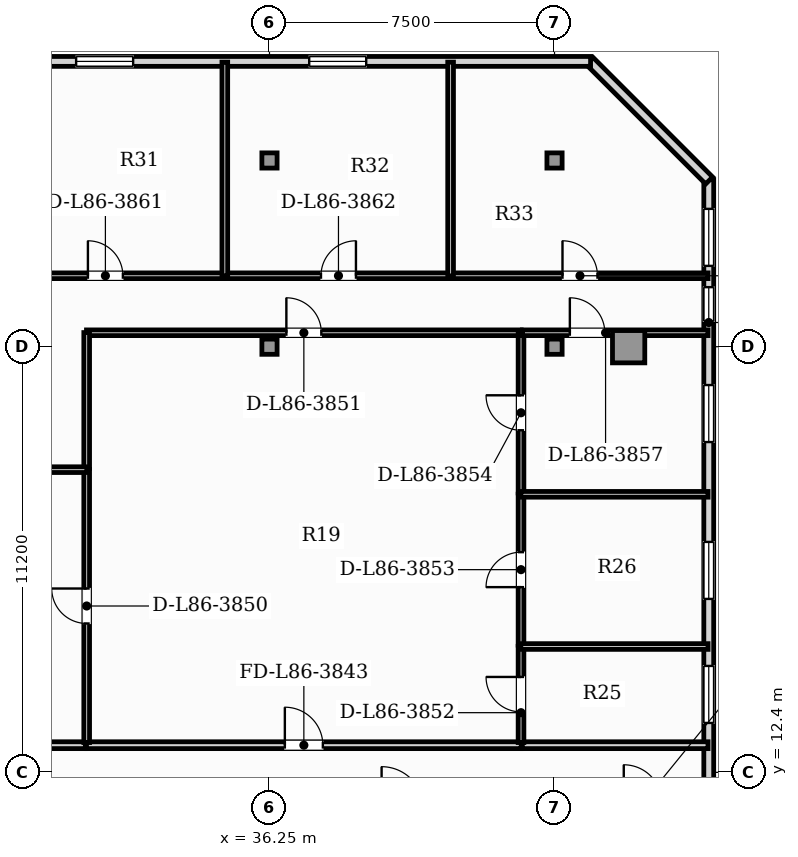
"""IFC4 building model, lengths in metres.
Left out: names, types, materials, properties, quantities, classifications, styles, units other than length and angle.
Written with IfcOpenShell. Run it as: python <this file> out.ifc"""

import sys

from ifc_helpers import new_model, si_unit, direction, frame, frame_2d, origin, origin_2d, place, context, subcontext, project, spatial, rectangle, hollow_rectangle, extrude, element, fill, save


model = new_model("IFC4")
c1 = context("Model", 3, precision=1e-05, world=origin(), true_north=direction((0.0, 1.0)))
c2 = subcontext(c1, "Body", "Model", "MODEL_VIEW")
j1 = project(units=[si_unit("LENGTHUNIT", "METRE"), si_unit("PLANEANGLEUNIT", "RADIAN")], contexts=[c1])
p1 = place(None, origin())
s1 = spatial("IfcSite", under=j1, at=p1, CompositionType="ELEMENT")
p2 = place(p1, origin())
s2 = spatial("IfcBuilding", under=s1, at=p2, CompositionType="ELEMENT")
p3 = place(p2, frame((0.0, 0.0, 349.05)))
s3 = spatial("IfcBuildingStorey", under=s2, at=p3, CompositionType="ELEMENT", Elevation=349.05)
p4 = place(p3, frame((45.7, 23.6, 0.0), z_axis=(0.0, 0.0, 1.0), x_axis=(1.0, 0.0, 0.0)))
e1 = element("IfcColumn", 1, at=p4, inside=s3, PredefinedType="USERDEFINED", context=c2, shape_type="SweptSolid", body=[
    extrude(hollow_rectangle(XDim=0.85, YDim=0.85, WallThickness=0.05, at=origin_2d()), origin(), (0.0, 0.0, 1.0), 4.4),
])
for number, where, z_axis, x_axis in (
    (2, (36.25, 23.6, 0.0), (0.0, 0.0, 1.0), (1.0, 0.0, 0.0)),
    (3, (43.75, 23.6, 0.0), (0.0, 0.0, 1.0), (1.0, 0.0, 0.0)),
    (4, (36.25, 28.5, 0.0), (0.0, 0.0, 1.0), (1.0, 0.0, 0.0)),
    (5, (43.75, 28.5, 0.0), (0.0, 0.0, 1.0), (1.0, 0.0, 0.0)),
):
    element("IfcColumn", number, at=place(p3, frame(where, z_axis=z_axis, x_axis=x_axis)), inside=s3, PredefinedType="COLUMN", context=c2, shape_type="SweptSolid", body=[
        extrude(hollow_rectangle(XDim=0.4, YDim=0.4, WallThickness=0.02, at=origin_2d()), origin(), (0.0, 0.0, 1.0), 4.4),
    ])
p5 = place(p3, frame((47.808, 3.24, 0.0), z_axis=(0.0, 0.0, 1.0), x_axis=(0.0, 1.0, 0.0)))
e6 = element("IfcWall", 6, at=p5, inside=s3, PredefinedType="SOLIDWALL", context=c2, shape_type="SweptSolid", body=[
    extrude(rectangle(XDim=24.757, YDim=0.26, at=frame_2d((12.378, 0.0))), origin(), (0.0, 0.0, 1.0), 4.14),
])
p6 = place(p5, frame((21.027, 0.0, 0.95)))
e7 = element("IfcOpeningElement", 7, at=p6, cuts=e6, PredefinedType="OPENING", context=c2, shape_type="SweptSolid", body=[
    extrude(rectangle(XDim=0.9, YDim=1.5, at=frame_2d((0.45, 0.75))), frame((0.0, 0.14, 0.0), z_axis=(0.0, -1.0, 0.0), x_axis=(1.0, 0.0, 0.0)), (0.0, 0.0, 1.0), 0.28),
])
p7 = place(p5, frame((10.461, 0.0, 0.9)))
e8 = element("IfcOpeningElement", 8, at=p7, cuts=e6, PredefinedType="OPENING", context=c2, shape_type="SweptSolid", body=[
    extrude(rectangle(XDim=1.5, YDim=1.95, at=frame_2d((0.75, 0.975))), frame((0.0, 0.14, 0.0), z_axis=(0.0, -1.0, 0.0), x_axis=(1.0, 0.0, 0.0)), (0.0, 0.0, 1.0), 0.28),
])
p8 = place(p5, frame((13.724, 0.0, 0.9)))
e9 = element("IfcOpeningElement", 9, at=p8, cuts=e6, PredefinedType="OPENING", context=c2, shape_type="SweptSolid", body=[
    extrude(rectangle(XDim=1.5, YDim=1.95, at=frame_2d((0.75, 0.975))), frame((0.0, 0.14, 0.0), z_axis=(0.0, -1.0, 0.0), x_axis=(1.0, 0.0, 0.0)), (0.0, 0.0, 1.0), 0.28),
])
p9 = place(p5, frame((17.852, 0.0, 0.9)))
e10 = element("IfcOpeningElement", 10, at=p9, cuts=e6, PredefinedType="OPENING", context=c2, shape_type="SweptSolid", body=[
    extrude(rectangle(XDim=1.5, YDim=1.95, at=frame_2d((0.75, 0.975))), frame((0.0, 0.14, 0.0), z_axis=(0.0, -1.0, 0.0), x_axis=(1.0, 0.0, 0.0)), (0.0, 0.0, 1.0), 0.28),
])
p10 = place(p5, frame((22.487, 0.0, 0.9)))
e11 = element("IfcOpeningElement", 11, at=p10, cuts=e6, PredefinedType="OPENING", context=c2, shape_type="SweptSolid", body=[
    extrude(rectangle(XDim=1.5, YDim=1.95, at=frame_2d((0.75, 0.975))), frame((0.0, 0.14, 0.0), z_axis=(0.0, -1.0, 0.0), x_axis=(1.0, 0.0, 0.0)), (0.0, 0.0, 1.0), 0.28),
])
p11 = place(p3, frame((47.818, 27.973, 0.0), z_axis=(0.0, 0.0, 1.0), x_axis=(-0.707106781187, 0.707106781187, 0.0)))
e12 = element("IfcWall", 12, at=p11, inside=s3, PredefinedType="SOLIDWALL", context=c2, shape_type="SweptSolid", body=[
    extrude(rectangle(XDim=4.445, YDim=0.26, at=frame_2d((2.223, 0.0))), origin(), (0.0, 0.0, 1.0), 4.14),
])
p12 = place(p3, frame((44.698, 31.107, 0.0), z_axis=(0.0, 0.0, 1.0), x_axis=(-1.0, 0.0, 0.0)))
e13 = element("IfcWall", 13, at=p12, inside=s3, PredefinedType="SOLIDWALL", context=c2, shape_type="SweptSolid", body=[
    extrude(rectangle(XDim=31.896, YDim=0.26, at=frame_2d((15.948, 0.0))), origin(), (0.0, 0.0, 1.0), 4.14),
])
p13 = place(p12, frame((27.179, 0.0, 0.9)))
e14 = element("IfcOpeningElement", 14, at=p13, cuts=e13, PredefinedType="OPENING", context=c2, shape_type="SweptSolid", body=[
    extrude(rectangle(XDim=1.5, YDim=1.95, at=frame_2d((0.75, 0.975))), frame((0.0, 0.14, 0.0), z_axis=(0.0, -1.0, 0.0), x_axis=(1.0, 0.0, 0.0)), (0.0, 0.0, 1.0), 0.28),
])
p14 = place(p12, frame((23.149, 0.0, 0.9)))
e15 = element("IfcOpeningElement", 15, at=p14, cuts=e13, PredefinedType="OPENING", context=c2, shape_type="SweptSolid", body=[
    extrude(rectangle(XDim=1.5, YDim=1.95, at=frame_2d((0.75, 0.975))), frame((0.0, 0.14, 0.0), z_axis=(0.0, -1.0, 0.0), x_axis=(1.0, 0.0, 0.0)), (0.0, 0.0, 1.0), 0.28),
])
p15 = place(p12, frame((17.689, 0.0, 0.9)))
e16 = element("IfcOpeningElement", 16, at=p15, cuts=e13, PredefinedType="OPENING", context=c2, shape_type="SweptSolid", body=[
    extrude(rectangle(XDim=1.5, YDim=1.95, at=frame_2d((0.75, 0.975))), frame((0.0, 0.14, 0.0), z_axis=(0.0, -1.0, 0.0), x_axis=(1.0, 0.0, 0.0)), (0.0, 0.0, 1.0), 0.28),
])
p16 = place(p12, frame((12.036, 0.0, 0.9)))
e17 = element("IfcOpeningElement", 17, at=p16, cuts=e13, PredefinedType="OPENING", context=c2, shape_type="SweptSolid", body=[
    extrude(rectangle(XDim=1.5, YDim=1.95, at=frame_2d((0.75, 0.975))), frame((0.0, 0.14, 0.0), z_axis=(0.0, -1.0, 0.0), x_axis=(1.0, 0.0, 0.0)), (0.0, 0.0, 1.0), 0.28),
])
p17 = place(p12, frame((5.903, 0.0, 0.9)))
e18 = element("IfcOpeningElement", 18, at=p17, cuts=e13, PredefinedType="OPENING", context=c2, shape_type="SweptSolid", body=[
    extrude(rectangle(XDim=1.5, YDim=1.95, at=frame_2d((0.75, 0.975))), frame((0.0, 0.14, 0.0), z_axis=(0.0, -1.0, 0.0), x_axis=(1.0, 0.0, 0.0)), (0.0, 0.0, 1.0), 0.28),
])
p18 = place(p3, frame((31.435, 13.115, 0.0), z_axis=(0.0, 0.0, 1.0), x_axis=(1.0, 0.0, 0.0)))
e19 = element("IfcWall", 19, at=p18, inside=s3, PredefinedType="PARTITIONING", context=c2, shape_type="SweptSolid", body=[
    extrude(rectangle(XDim=11.438, YDim=0.18, at=frame_2d((5.719, 0.0))), origin(), (0.0, 0.0, 1.0), 4.14),
])
p19 = place(p18, frame((5.219, 0.0, 0.0)))
e20 = element("IfcOpeningElement", 20, at=p19, cuts=e19, PredefinedType="OPENING", context=c2, shape_type="SweptSolid", body=[
    extrude(rectangle(XDim=1.0, YDim=2.15, at=frame_2d((0.5, 1.075))), frame((0.0, 0.1, 0.0), z_axis=(0.0, -1.0, 0.0), x_axis=(1.0, 0.0, 0.0)), (0.0, 0.0, 1.0), 0.2),
])
p20 = place(p3, frame((26.095, 13.115, 0.0), z_axis=(0.0, 0.0, 1.0), x_axis=(1.0, 0.0, 0.0)))
e21 = element("IfcWall", 21, at=p20, inside=s3, PredefinedType="PARTITIONING", context=c2, shape_type="SweptSolid", body=[
    extrude(rectangle(XDim=5.31, YDim=0.18, at=frame_2d((2.655, 0.0))), origin(), (0.0, 0.0, 1.0), 4.14),
])
p21 = place(p20, frame((2.155, 0.0, 0.0)))
e22 = element("IfcOpeningElement", 22, at=p21, cuts=e21, PredefinedType="OPENING", context=c2, shape_type="SweptSolid", body=[
    extrude(rectangle(XDim=1.0, YDim=2.15, at=frame_2d((0.5, 1.075))), frame((0.0, 0.1, 0.0), z_axis=(0.0, -1.0, 0.0), x_axis=(1.0, 0.0, 0.0)), (0.0, 0.0, 1.0), 0.2),
])
p22 = place(p3, frame((42.903, 13.115, 0.0), z_axis=(0.0, 0.0, 1.0), x_axis=(1.0, 0.0, 0.0)))
e23 = element("IfcWall", 23, at=p22, inside=s3, PredefinedType="PARTITIONING", context=c2, shape_type="SweptSolid", body=[
    extrude(rectangle(XDim=4.885, YDim=0.18, at=frame_2d((2.443, 0.0))), origin(), (0.0, 0.0, 1.0), 4.14),
])
p23 = place(p3, frame((31.44, 13.185, 0.0), z_axis=(0.0, 0.0, 1.0), x_axis=(0.0, 1.0, 0.0)))
e24 = element("IfcWall", 24, at=p23, inside=s3, PredefinedType="PARTITIONING", context=c2, shape_type="SweptSolid", body=[
    extrude(rectangle(XDim=7.185, YDim=0.15, at=frame_2d((3.593, 0.0))), origin(), (0.0, 0.0, 1.0), 4.14),
])
p24 = place(p23, frame((3.133, 0.0, 0.0)))
e25 = element("IfcOpeningElement", 25, at=p24, cuts=e24, PredefinedType="OPENING", context=c2, shape_type="SweptSolid", body=[
    extrude(rectangle(XDim=0.92, YDim=2.1, at=frame_2d((0.46, 1.05))), frame((0.0, 0.085, 0.0), z_axis=(0.0, -1.0, 0.0), x_axis=(1.0, 0.0, 0.0)), (0.0, 0.0, 1.0), 0.17),
])
p25 = place(p3, frame((31.435, 23.967, 0.0), z_axis=(0.0, 0.0, 1.0), x_axis=(1.0, 0.0, 0.0)))
e26 = element("IfcWall", 26, at=p25, inside=s3, PredefinedType="PARTITIONING", context=c2, shape_type="SweptSolid", body=[
    extrude(rectangle(XDim=11.438, YDim=0.15, at=frame_2d((5.719, 0.0))), origin(), (0.0, 0.0, 1.0), 4.14),
])
p26 = place(p25, frame((5.259, 0.0, 0.0)))
e27 = element("IfcOpeningElement", 27, at=p26, cuts=e26, PredefinedType="OPENING", context=c2, shape_type="SweptSolid", body=[
    extrude(rectangle(XDim=0.92, YDim=2.1, at=frame_2d((0.46, 1.05))), frame((0.0, 0.085, 0.0), z_axis=(0.0, -1.0, 0.0), x_axis=(1.0, 0.0, 0.0)), (0.0, 0.0, 1.0), 0.17),
])
p27 = place(p3, frame((31.44, 20.4, 0.0), z_axis=(0.0, 0.0, 1.0), x_axis=(0.0, 1.0, 0.0)))
e28 = element("IfcWall", 28, at=p27, inside=s3, PredefinedType="PARTITIONING", context=c2, shape_type="SweptSolid", body=[
    extrude(rectangle(XDim=3.572, YDim=0.15, at=frame_2d((1.786, 0.0))), origin(), (0.0, 0.0, 1.0), 4.14),
])
p28 = place(p3, frame((42.868, 13.185, 0.0), z_axis=(0.0, 0.0, 1.0), x_axis=(0.0, 1.0, 0.0)))
e29 = element("IfcWall", 29, at=p28, inside=s3, PredefinedType="PARTITIONING", context=c2, shape_type="SweptSolid", body=[
    extrude(rectangle(XDim=2.531, YDim=0.15, at=frame_2d((1.266, 0.0))), origin(), (0.0, 0.0, 1.0), 4.14),
])
p29 = place(p28, frame((0.806, 0.0, 0.0)))
e30 = element("IfcOpeningElement", 30, at=p29, cuts=e29, PredefinedType="OPENING", context=c2, shape_type="SweptSolid", body=[
    extrude(rectangle(XDim=0.92, YDim=2.1, at=frame_2d((0.46, 1.05))), frame((0.0, 0.085, 0.0), z_axis=(0.0, -1.0, 0.0), x_axis=(1.0, 0.0, 0.0)), (0.0, 0.0, 1.0), 0.17),
])
p30 = place(p3, frame((42.868, 15.747, 0.0), z_axis=(0.0, 0.0, 1.0), x_axis=(0.0, 1.0, 0.0)))
e31 = element("IfcWall", 31, at=p30, inside=s3, PredefinedType="PARTITIONING", context=c2, shape_type="SweptSolid", body=[
    extrude(rectangle(XDim=3.975, YDim=0.15, at=frame_2d((1.987, 0.0))), origin(), (0.0, 0.0, 1.0), 4.14),
])
p31 = place(p30, frame((1.527, 0.0, 0.0)))
e32 = element("IfcOpeningElement", 32, at=p31, cuts=e31, PredefinedType="OPENING", context=c2, shape_type="SweptSolid", body=[
    extrude(rectangle(XDim=0.92, YDim=2.1, at=frame_2d((0.46, 1.05))), frame((0.0, 0.085, 0.0), z_axis=(0.0, -1.0, 0.0), x_axis=(1.0, 0.0, 0.0)), (0.0, 0.0, 1.0), 0.17),
])
p32 = place(p3, frame((42.868, 19.751, 0.0), z_axis=(0.0, 0.0, 1.0), x_axis=(0.0, 1.0, 0.0)))
e33 = element("IfcWall", 33, at=p32, inside=s3, PredefinedType="PARTITIONING", context=c2, shape_type="SweptSolid", body=[
    extrude(rectangle(XDim=4.221, YDim=0.15, at=frame_2d((2.11, 0.0))), origin(), (0.0, 0.0, 1.0), 4.14),
])
p33 = place(p32, frame((1.65, 0.0, 0.0)))
e34 = element("IfcOpeningElement", 34, at=p33, cuts=e33, PredefinedType="OPENING", context=c2, shape_type="SweptSolid", body=[
    extrude(rectangle(XDim=0.92, YDim=2.1, at=frame_2d((0.46, 1.05))), frame((0.0, 0.085, 0.0), z_axis=(0.0, -1.0, 0.0), x_axis=(1.0, 0.0, 0.0)), (0.0, 0.0, 1.0), 0.17),
])
p34 = place(p3, frame((26.055, 20.365, 0.0), z_axis=(0.0, 0.0, 1.0), x_axis=(1.0, 0.0, 0.0)))
e35 = element("IfcWall", 35, at=p34, inside=s3, PredefinedType="PARTITIONING", context=c2, shape_type="SweptSolid", body=[
    extrude(rectangle(XDim=5.39, YDim=0.15, at=frame_2d((2.695, 0.0))), origin(), (0.0, 0.0, 1.0), 4.14),
])
p35 = place(p34, frame((2.235, 0.0, 0.0)))
e36 = element("IfcOpeningElement", 36, at=p35, cuts=e35, PredefinedType="OPENING", context=c2, shape_type="SweptSolid", body=[
    extrude(rectangle(XDim=0.92, YDim=2.1, at=frame_2d((0.46, 1.05))), frame((0.0, 0.085, 0.0), z_axis=(0.0, -1.0, 0.0), x_axis=(1.0, 0.0, 0.0)), (0.0, 0.0, 1.0), 0.17),
])
p36 = place(p3, frame((42.903, 23.967, 0.0), z_axis=(0.0, 0.0, 1.0), x_axis=(1.0, 0.0, 0.0)))
e37 = element("IfcWall", 37, at=p36, inside=s3, PredefinedType="PARTITIONING", context=c2, shape_type="SweptSolid", body=[
    extrude(rectangle(XDim=4.885, YDim=0.15, at=frame_2d((2.443, 0.0))), origin(), (0.0, 0.0, 1.0), 4.14),
])
p37 = place(p36, frame((1.25, 0.0, 0.0)))
e38 = element("IfcOpeningElement", 38, at=p37, cuts=e37, PredefinedType="OPENING", context=c2, shape_type="SweptSolid", body=[
    extrude(rectangle(XDim=0.92, YDim=2.1, at=frame_2d((0.46, 1.05))), frame((0.0, 0.085, 0.0), z_axis=(0.0, -1.0, 0.0), x_axis=(1.0, 0.0, 0.0)), (0.0, 0.0, 1.0), 0.17),
])
p38 = place(p3, frame((28.785, 25.467, 0.0), z_axis=(0.0, 0.0, 1.0), x_axis=(1.0, 0.0, 0.0)))
e39 = element("IfcWall", 39, at=p38, inside=s3, PredefinedType="PARTITIONING", context=c2, shape_type="SweptSolid", body=[
    extrude(rectangle(XDim=6.295, YDim=0.15, at=frame_2d((3.147, 0.0))), origin(), (0.0, 0.0, 1.0), 4.14),
])
p39 = place(p38, frame((2.688, 0.0, 0.0)))
e40 = element("IfcOpeningElement", 40, at=p39, cuts=e39, PredefinedType="OPENING", context=c2, shape_type="SweptSolid", body=[
    extrude(rectangle(XDim=0.92, YDim=2.1, at=frame_2d((0.46, 1.05))), frame((0.0, 0.085, 0.0), z_axis=(0.0, -1.0, 0.0), x_axis=(1.0, 0.0, 0.0)), (0.0, 0.0, 1.0), 0.17),
])
p40 = place(p3, frame((35.11, 25.467, 0.0), z_axis=(0.0, 0.0, 1.0), x_axis=(1.0, 0.0, 0.0)))
e41 = element("IfcWall", 41, at=p40, inside=s3, PredefinedType="PARTITIONING", context=c2, shape_type="SweptSolid", body=[
    extrude(rectangle(XDim=5.911, YDim=0.15, at=frame_2d((2.955, 0.0))), origin(), (0.0, 0.0, 1.0), 4.14),
])
p41 = place(p40, frame((2.495, 0.0, 0.0)))
e42 = element("IfcOpeningElement", 42, at=p41, cuts=e41, PredefinedType="OPENING", context=c2, shape_type="SweptSolid", body=[
    extrude(rectangle(XDim=0.92, YDim=2.1, at=frame_2d((0.46, 1.05))), frame((0.0, 0.085, 0.0), z_axis=(0.0, -1.0, 0.0), x_axis=(1.0, 0.0, 0.0)), (0.0, 0.0, 1.0), 0.17),
])
p42 = place(p3, frame((41.051, 25.467, 0.0), z_axis=(0.0, 0.0, 1.0), x_axis=(1.0, 0.0, 0.0)))
e43 = element("IfcWall", 43, at=p42, inside=s3, PredefinedType="PARTITIONING", context=c2, shape_type="SweptSolid", body=[
    extrude(rectangle(XDim=6.738, YDim=0.15, at=frame_2d((3.369, 0.0))), origin(), (0.0, 0.0, 1.0), 4.14),
])
p43 = place(p42, frame((2.909, 0.0, 0.0)))
e44 = element("IfcOpeningElement", 44, at=p43, cuts=e43, PredefinedType="OPENING", context=c2, shape_type="SweptSolid", body=[
    extrude(rectangle(XDim=0.92, YDim=2.1, at=frame_2d((0.46, 1.05))), frame((0.0, 0.085, 0.0), z_axis=(0.0, -1.0, 0.0), x_axis=(1.0, 0.0, 0.0)), (0.0, 0.0, 1.0), 0.17),
])
for number, where, z_axis, x_axis in (
    (45, (42.863, 15.711, 0.0), (0.0, 0.0, 1.0), (1.0, 0.0, 0.0)),
    (46, (42.863, 19.716, 0.0), (0.0, 0.0, 1.0), (1.0, 0.0, 0.0)),
):
    element("IfcWall", number, at=place(p3, frame(where, z_axis=z_axis, x_axis=x_axis)), inside=s3, PredefinedType="PARTITIONING", context=c2, shape_type="SweptSolid", body=[
        extrude(rectangle(XDim=4.926, YDim=0.15, at=frame_2d((2.463, 0.0))), origin(), (0.0, 0.0, 1.0), 4.14),
    ])
for number, where, z_axis, x_axis in (
    (47, (35.075, 25.462, 0.0), (0.0, 0.0, 1.0), (0.0, 1.0, 0.0)),
    (48, (41.015, 25.462, 0.0), (0.0, 0.0, 1.0), (0.0, 1.0, 0.0)),
):
    element("IfcWall", number, at=place(p3, frame(where, z_axis=z_axis, x_axis=x_axis)), inside=s3, PredefinedType="PARTITIONING", context=c2, shape_type="SweptSolid", body=[
        extrude(rectangle(XDim=5.625, YDim=0.15, at=frame_2d((2.813, 0.0))), origin(), (0.0, 0.0, 1.0), 4.14),
    ])
p44 = place(p6, origin())
e49 = element("IfcWindow", 49, at=p44, inside=s3, PartitioningType="SINGLE_PANEL", PredefinedType="WINDOW", context=c2, shape_type="SweptSolid", body=[
    extrude(rectangle(XDim=0.9, YDim=1.5, at=frame_2d((0.45, 0.75))), frame((0.0, 0.03, 0.0), z_axis=(0.0, -1.0, 0.0), x_axis=(1.0, 0.0, 0.0)), (0.0, 0.0, 1.0), 0.06),
])
fill(e7, e49)
p45 = place(p7, origin())
e50 = element("IfcWindow", 50, at=p45, inside=s3, PartitioningType="SINGLE_PANEL", PredefinedType="WINDOW", context=c2, shape_type="SweptSolid", body=[
    extrude(rectangle(XDim=1.5, YDim=1.95, at=frame_2d((0.75, 0.975))), frame((0.0, 0.03, 0.0), z_axis=(0.0, -1.0, 0.0), x_axis=(1.0, 0.0, 0.0)), (0.0, 0.0, 1.0), 0.06),
])
fill(e8, e50)
p46 = place(p8, origin())
e51 = element("IfcWindow", 51, at=p46, inside=s3, PartitioningType="SINGLE_PANEL", PredefinedType="WINDOW", context=c2, shape_type="SweptSolid", body=[
    extrude(rectangle(XDim=1.5, YDim=1.95, at=frame_2d((0.75, 0.975))), frame((0.0, 0.03, 0.0), z_axis=(0.0, -1.0, 0.0), x_axis=(1.0, 0.0, 0.0)), (0.0, 0.0, 1.0), 0.06),
])
fill(e9, e51)
p47 = place(p9, origin())
e52 = element("IfcWindow", 52, at=p47, inside=s3, PartitioningType="SINGLE_PANEL", PredefinedType="WINDOW", context=c2, shape_type="SweptSolid", body=[
    extrude(rectangle(XDim=1.5, YDim=1.95, at=frame_2d((0.75, 0.975))), frame((0.0, 0.03, 0.0), z_axis=(0.0, -1.0, 0.0), x_axis=(1.0, 0.0, 0.0)), (0.0, 0.0, 1.0), 0.06),
])
fill(e10, e52)
p48 = place(p16, origin())
e53 = element("IfcWindow", 53, at=p48, inside=s3, PartitioningType="SINGLE_PANEL", PredefinedType="WINDOW", context=c2, shape_type="SweptSolid", body=[
    extrude(rectangle(XDim=1.5, YDim=1.95, at=frame_2d((0.75, 0.975))), frame((0.0, 0.03, 0.0), z_axis=(0.0, -1.0, 0.0), x_axis=(1.0, 0.0, 0.0)), (0.0, 0.0, 1.0), 0.06),
])
fill(e17, e53)
p49 = place(p17, origin())
e54 = element("IfcWindow", 54, at=p49, inside=s3, PartitioningType="SINGLE_PANEL", PredefinedType="WINDOW", context=c2, shape_type="SweptSolid", body=[
    extrude(rectangle(XDim=1.5, YDim=1.95, at=frame_2d((0.75, 0.975))), frame((0.0, 0.03, 0.0), z_axis=(0.0, -1.0, 0.0), x_axis=(1.0, 0.0, 0.0)), (0.0, 0.0, 1.0), 0.06),
])
fill(e18, e54)
p50 = place(p10, origin())
e55 = element("IfcWindow", 55, at=p50, inside=s3, PartitioningType="SINGLE_PANEL", PredefinedType="WINDOW", context=c2, shape_type="SweptSolid", body=[
    extrude(rectangle(XDim=1.5, YDim=1.95, at=frame_2d((0.75, 0.975))), frame((0.0, 0.03, 0.0), z_axis=(0.0, -1.0, 0.0), x_axis=(1.0, 0.0, 0.0)), (0.0, 0.0, 1.0), 0.06),
])
fill(e11, e55)
p51 = place(p19, origin())
e56 = element("IfcDoor", 56, at=p51, inside=s3, OperationType="SINGLE_SWING_LEFT", PredefinedType="DOOR", context=c2, shape_type="SweptSolid", body=[
    extrude(rectangle(XDim=1.0, YDim=2.15, at=frame_2d((0.5, 1.075))), frame((0.0, 0.025, 0.0), z_axis=(0.0, -1.0, 0.0), x_axis=(1.0, 0.0, 0.0)), (0.0, 0.0, 1.0), 0.05),
])
fill(e20, e56)
p52 = place(p24, origin())
e57 = element("IfcDoor", 57, at=p52, inside=s3, OperationType="SINGLE_SWING_RIGHT", PredefinedType="DOOR", context=c2, shape_type="SweptSolid", body=[
    extrude(rectangle(XDim=0.92, YDim=2.1, at=frame_2d((0.46, 1.05))), frame((0.0, 0.025, 0.0), z_axis=(0.0, -1.0, 0.0), x_axis=(1.0, 0.0, 0.0)), (0.0, 0.0, 1.0), 0.05),
])
fill(e25, e57)
p53 = place(p26, origin())
e58 = element("IfcDoor", 58, at=p53, inside=s3, OperationType="SINGLE_SWING_LEFT", PredefinedType="DOOR", context=c2, shape_type="SweptSolid", body=[
    extrude(rectangle(XDim=0.92, YDim=2.1, at=frame_2d((0.46, 1.05))), frame((0.0, 0.025, 0.0), z_axis=(0.0, -1.0, 0.0), x_axis=(1.0, 0.0, 0.0)), (0.0, 0.0, 1.0), 0.05),
])
fill(e27, e58)
p54 = place(p29, origin())
e59 = element("IfcDoor", 59, at=p54, inside=s3, OperationType="SINGLE_SWING_RIGHT", PredefinedType="DOOR", context=c2, shape_type="SweptSolid", body=[
    extrude(rectangle(XDim=0.92, YDim=2.1, at=frame_2d((0.46, 1.05))), frame((0.0, 0.025, 0.0), z_axis=(0.0, -1.0, 0.0), x_axis=(1.0, 0.0, 0.0)), (0.0, 0.0, 1.0), 0.05),
])
fill(e30, e59)
p55 = place(p31, origin())
e60 = element("IfcDoor", 60, at=p55, inside=s3, OperationType="SINGLE_SWING_LEFT", PredefinedType="DOOR", context=c2, shape_type="SweptSolid", body=[
    extrude(rectangle(XDim=0.92, YDim=2.1, at=frame_2d((0.46, 1.05))), frame((0.0, 0.025, 0.0), z_axis=(0.0, -1.0, 0.0), x_axis=(1.0, 0.0, 0.0)), (0.0, 0.0, 1.0), 0.05),
])
fill(e32, e60)
p56 = place(p33, origin())
e61 = element("IfcDoor", 61, at=p56, inside=s3, OperationType="SINGLE_SWING_RIGHT", PredefinedType="DOOR", context=c2, shape_type="SweptSolid", body=[
    extrude(rectangle(XDim=0.92, YDim=2.1, at=frame_2d((0.46, 1.05))), frame((0.0, 0.025, 0.0), z_axis=(0.0, -1.0, 0.0), x_axis=(1.0, 0.0, 0.0)), (0.0, 0.0, 1.0), 0.05),
])
fill(e34, e61)
p57 = place(p37, origin())
e62 = element("IfcDoor", 62, at=p57, inside=s3, OperationType="SINGLE_SWING_LEFT", PredefinedType="DOOR", context=c2, shape_type="SweptSolid", body=[
    extrude(rectangle(XDim=0.92, YDim=2.1, at=frame_2d((0.46, 1.05))), frame((0.0, 0.025, 0.0), z_axis=(0.0, -1.0, 0.0), x_axis=(1.0, 0.0, 0.0)), (0.0, 0.0, 1.0), 0.05),
])
fill(e38, e62)
p58 = place(p39, origin())
e63 = element("IfcDoor", 63, at=p58, inside=s3, OperationType="SINGLE_SWING_LEFT", PredefinedType="DOOR", context=c2, shape_type="SweptSolid", body=[
    extrude(rectangle(XDim=0.92, YDim=2.1, at=frame_2d((0.46, 1.05))), frame((0.0, 0.025, 0.0), z_axis=(0.0, -1.0, 0.0), x_axis=(1.0, 0.0, 0.0)), (0.0, 0.0, 1.0), 0.05),
])
fill(e40, e63)
p59 = place(p41, origin())
e64 = element("IfcDoor", 64, at=p59, inside=s3, OperationType="SINGLE_SWING_RIGHT", PredefinedType="DOOR", context=c2, shape_type="SweptSolid", body=[
    extrude(rectangle(XDim=0.92, YDim=2.1, at=frame_2d((0.46, 1.05))), frame((0.0, 0.025, 0.0), z_axis=(0.0, -1.0, 0.0), x_axis=(1.0, 0.0, 0.0)), (0.0, 0.0, 1.0), 0.05),
])
fill(e42, e64)
p60 = place(p43, origin())
e65 = element("IfcDoor", 65, at=p60, inside=s3, OperationType="SINGLE_SWING_LEFT", PredefinedType="DOOR", context=c2, shape_type="SweptSolid", body=[
    extrude(rectangle(XDim=0.92, YDim=2.1, at=frame_2d((0.46, 1.05))), frame((0.0, 0.025, 0.0), z_axis=(0.0, -1.0, 0.0), x_axis=(1.0, 0.0, 0.0)), (0.0, 0.0, 1.0), 0.05),
])
fill(e44, e65)
save(model, sys.argv[1])
